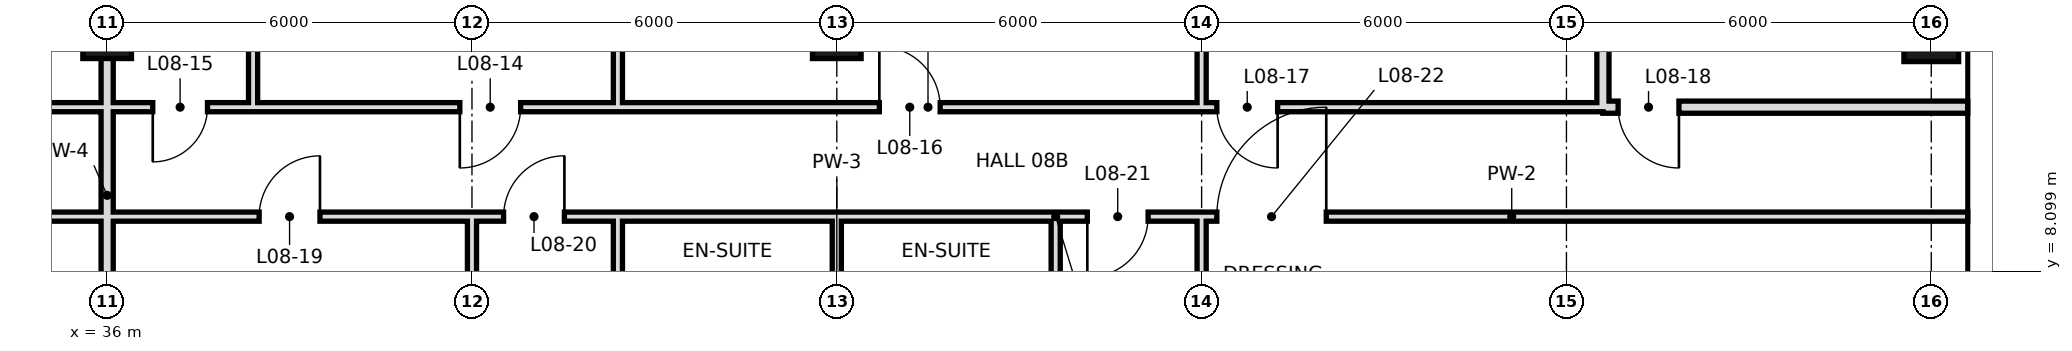
"""IFC4 building model, lengths in metres.
Left out: names, types, materials, properties, quantities, classifications, styles, units other than length and angle.
Written with IfcOpenShell. Run it as: python <this file> out.ifc"""

import sys

from ifc_helpers import new_model, si_unit, direction, frame, frame_2d, origin, origin_2d, place, context, subcontext, project, spatial, rectangle, hollow_rectangle, extrude, element, fill, save


model = new_model("IFC4")
c1 = context("Model", 3, precision=1e-05, world=origin(), true_north=direction((0.0, 1.0)))
c2 = subcontext(c1, "Body", "Model", "MODEL_VIEW")
j1 = project(units=[si_unit("LENGTHUNIT", "METRE"), si_unit("PLANEANGLEUNIT", "RADIAN")], contexts=[c1])
p1 = place(None, origin())
s1 = spatial("IfcSite", under=j1, at=p1, CompositionType="ELEMENT")
p2 = place(p1, origin())
s2 = spatial("IfcBuilding", under=s1, at=p2, CompositionType="ELEMENT")
p3 = place(p2, frame((0.0, 0.0, 49.8)))
s3 = spatial("IfcBuildingStorey", under=s2, at=p3, CompositionType="ELEMENT", Elevation=49.8)
for number, where, z_axis, x_axis in (
    (1, (36.0, 12.0, 0.0), (0.0, 0.0, 1.0), (1.0, 0.0, 0.0)),
    (2, (48.0, 12.0, 0.0), (0.0, 0.0, 1.0), (1.0, 0.0, 0.0)),
):
    element("IfcColumn", number, at=place(p3, frame(where, z_axis=z_axis, x_axis=x_axis)), inside=s3, PredefinedType="COLUMN", context=c2, shape_type="SweptSolid", body=[
        extrude(hollow_rectangle(XDim=0.8, YDim=0.8, WallThickness=0.04, at=origin_2d()), origin(), (0.0, 0.0, 1.0), 3.6),
    ])
p4 = place(p3, frame((66.0, 12.0, 0.0), z_axis=(0.0, 0.0, 1.0), x_axis=(1.0, 0.0, 0.0)))
e3 = element("IfcColumn", 3, at=p4, inside=s3, PredefinedType="COLUMN", context=c2, shape_type="SweptSolid", body=[
    extrude(hollow_rectangle(XDim=0.9, YDim=0.9, WallThickness=0.045, at=origin_2d()), origin(), (0.0, 0.0, 1.0), 3.6),
])
p5 = place(p3, frame((36.0, 0.0, 0.0), z_axis=(0.0, 0.0, 1.0), x_axis=(0.0, 1.0, 0.0)))
e4 = element("IfcWall", 4, at=p5, inside=s3, PredefinedType="SOLIDWALL", context=c2, shape_type="SweptSolid", body=[
    extrude(rectangle(XDim=18.7, YDim=0.2, at=frame_2d((9.35, 0.0))), origin(), (0.0, 0.0, 1.0), 2.72),
])
p6 = place(p3, frame((38.4, 10.8, 0.0), z_axis=(0.0, 0.0, 1.0), x_axis=(0.0, 1.0, 0.0)))
e5 = element("IfcWall", 5, at=p6, inside=s3, PredefinedType="PARTITIONING", context=c2, shape_type="SweptSolid", body=[
    extrude(rectangle(XDim=7.9, YDim=0.15, at=frame_2d((3.95, 0.0))), origin(), (0.0, 0.0, 1.0), 3.42),
])
p7 = place(p3, frame((42.0, -0.6, 0.0), z_axis=(0.0, 0.0, 1.0), x_axis=(0.0, 1.0, 0.0)))
e6 = element("IfcWall", 6, at=p7, inside=s3, PredefinedType="PARTITIONING", context=c2, shape_type="SweptSolid", body=[
    extrude(rectangle(XDim=9.6, YDim=0.15, at=frame_2d((4.8, 0.0))), origin(), (0.0, 0.0, 1.0), 2.72),
])
p8 = place(p3, frame((44.4, 10.8, 0.0), z_axis=(0.0, 0.0, 1.0), x_axis=(0.0, 1.0, 0.0)))
e7 = element("IfcWall", 7, at=p8, inside=s3, PredefinedType="PARTITIONING", context=c2, shape_type="SweptSolid", body=[
    extrude(rectangle(XDim=7.9, YDim=0.15, at=frame_2d((3.95, 0.0))), origin(), (0.0, 0.0, 1.0), 3.42),
])
p9 = place(p3, frame((44.4, 6.0, 0.0), z_axis=(0.0, 0.0, 1.0), x_axis=(0.0, 1.0, 0.0)))
e8 = element("IfcWall", 8, at=p9, inside=s3, PredefinedType="PARTITIONING", context=c2, shape_type="SweptSolid", body=[
    extrude(rectangle(XDim=3.0, YDim=0.15, at=frame_2d((1.5, 0.0))), origin(), (0.0, 0.0, 1.0), 3.42),
])
p10 = place(p3, frame((48.0, 6.0, 0.0), z_axis=(0.0, 0.0, 1.0), x_axis=(0.0, 1.0, 0.0)))
e9 = element("IfcWall", 9, at=p10, inside=s3, PredefinedType="PARTITIONING", context=c2, shape_type="SweptSolid", body=[
    extrude(rectangle(XDim=3.0, YDim=0.15, at=frame_2d((1.5, 0.0))), origin(), (0.0, 0.0, 1.0), 2.72),
])
p11 = place(p3, frame((51.6, 6.0, 0.0), z_axis=(0.0, 0.0, 1.0), x_axis=(0.0, 1.0, 0.0)))
e10 = element("IfcWall", 10, at=p11, inside=s3, PredefinedType="PARTITIONING", context=c2, shape_type="SweptSolid", body=[
    extrude(rectangle(XDim=3.0, YDim=0.15, at=frame_2d((1.5, 0.0))), origin(), (0.0, 0.0, 1.0), 3.42),
])
p12 = place(p3, frame((54.0, -0.6, 0.0), z_axis=(0.0, 0.0, 1.0), x_axis=(0.0, 1.0, 0.0)))
e11 = element("IfcWall", 11, at=p12, inside=s3, PredefinedType="PARTITIONING", context=c2, shape_type="SweptSolid", body=[
    extrude(rectangle(XDim=9.6, YDim=0.15, at=frame_2d((4.8, 0.0))), origin(), (0.0, 0.0, 1.0), 3.42),
])
p13 = place(p3, frame((54.0, 10.8, 0.0), z_axis=(0.0, 0.0, 1.0), x_axis=(0.0, 1.0, 0.0)))
e12 = element("IfcWall", 12, at=p13, inside=s3, PredefinedType="PARTITIONING", context=c2, shape_type="SweptSolid", body=[
    extrude(rectangle(XDim=7.2, YDim=0.15, at=frame_2d((3.6, 0.0))), origin(), (0.0, 0.0, 1.0), 3.42),
])
p14 = place(p3, frame((60.6, 10.8, 0.0), z_axis=(0.0, 0.0, 1.0), x_axis=(0.0, 1.0, 0.0)))
e13 = element("IfcWall", 13, at=p14, inside=s3, PredefinedType="SOLIDWALL", context=c2, shape_type="SweptSolid", body=[
    extrude(rectangle(XDim=7.2, YDim=0.2, at=frame_2d((3.6, 0.0))), origin(), (0.0, 0.0, 1.0), 2.52),
])
p15 = place(p3, frame((60.6, 10.8, 0.0), z_axis=(0.0, 0.0, 1.0), x_axis=(1.0, 0.0, 0.0)))
e14 = element("IfcWall", 14, at=p15, inside=s3, PredefinedType="SOLIDWALL", context=c2, shape_type="SweptSolid", body=[
    extrude(rectangle(XDim=6.0, YDim=0.2, at=frame_2d((3.0, 0.0))), origin(), (0.0, 0.0, 1.0), 2.97),
])
p16 = place(p15, frame((0.25, 0.0, 0.0)))
e15 = element("IfcOpeningElement", 15, at=p16, cuts=e14, PredefinedType="OPENING", context=c2, shape_type="SweptSolid", body=[
    extrude(rectangle(XDim=1.0, YDim=2.4, at=frame_2d((0.5, 1.2))), frame((0.0, 0.11, 0.0), z_axis=(0.0, -1.0, 0.0), x_axis=(1.0, 0.0, 0.0)), (0.0, 0.0, 1.0), 0.22),
])
p17 = place(p3, frame((6.6, 10.8, 0.0), z_axis=(0.0, 0.0, 1.0), x_axis=(1.0, 0.0, 0.0)))
e16 = element("IfcWall", 16, at=p17, inside=s3, PredefinedType="PARTITIONING", context=c2, shape_type="SweptSolid", body=[
    extrude(rectangle(XDim=29.4, YDim=0.15, at=frame_2d((14.7, 0.0))), origin(), (0.0, 0.0, 1.0), 3.42),
])
p18 = place(p17, frame((26.8, 0.0, 0.0)))
e17 = element("IfcOpeningElement", 17, at=p18, cuts=e16, PredefinedType="OPENING", context=c2, shape_type="SweptSolid", body=[
    extrude(rectangle(XDim=1.0, YDim=2.4, at=frame_2d((0.5, 1.2))), frame((0.0, 0.085, 0.0), z_axis=(0.0, -1.0, 0.0), x_axis=(1.0, 0.0, 0.0)), (0.0, 0.0, 1.0), 0.17),
])
p19 = place(p17, frame((3.22, 0.0, 0.0)))
e18 = element("IfcOpeningElement", 18, at=p19, cuts=e16, PredefinedType="OPENING", context=c2, shape_type="SweptSolid", body=[
    extrude(rectangle(XDim=1.0, YDim=2.4, at=frame_2d((0.5, 1.2))), frame((0.0, 0.085, 0.0), z_axis=(0.0, -1.0, 0.0), x_axis=(1.0, 0.0, 0.0)), (0.0, 0.0, 1.0), 0.17),
])
p20 = place(p17, frame((14.8, 0.0, 0.0)))
e19 = element("IfcOpeningElement", 19, at=p20, cuts=e16, PredefinedType="OPENING", context=c2, shape_type="SweptSolid", body=[
    extrude(rectangle(XDim=1.0, YDim=2.4, at=frame_2d((0.5, 1.2))), frame((0.0, 0.085, 0.0), z_axis=(0.0, -1.0, 0.0), x_axis=(1.0, 0.0, 0.0)), (0.0, 0.0, 1.0), 0.17),
])
p21 = place(p3, frame((38.4, 10.8, 0.0), z_axis=(0.0, 0.0, 1.0), x_axis=(1.0, 0.0, 0.0)))
e20 = element("IfcWall", 20, at=p21, inside=s3, PredefinedType="PARTITIONING", context=c2, shape_type="SweptSolid", body=[
    extrude(rectangle(XDim=22.2, YDim=0.15, at=frame_2d((11.1, 0.0))), origin(), (0.0, 0.0, 1.0), 3.42),
])
p22 = place(p21, frame((3.4, 0.0, 0.0)))
e21 = element("IfcOpeningElement", 21, at=p22, cuts=e20, PredefinedType="OPENING", context=c2, shape_type="SweptSolid", body=[
    extrude(rectangle(XDim=1.0, YDim=2.4, at=frame_2d((0.5, 1.2))), frame((0.0, 0.085, 0.0), z_axis=(0.0, -1.0, 0.0), x_axis=(1.0, 0.0, 0.0)), (0.0, 0.0, 1.0), 0.17),
])
p23 = place(p21, frame((10.3, 0.0, 0.0)))
e22 = element("IfcOpeningElement", 22, at=p23, cuts=e20, PredefinedType="OPENING", context=c2, shape_type="SweptSolid", body=[
    extrude(rectangle(XDim=1.0, YDim=2.4, at=frame_2d((0.5, 1.2))), frame((0.0, 0.085, 0.0), z_axis=(0.0, -1.0, 0.0), x_axis=(1.0, 0.0, 0.0)), (0.0, 0.0, 1.0), 0.17),
])
p24 = place(p21, frame((15.85, 0.0, 0.0)))
e23 = element("IfcOpeningElement", 23, at=p24, cuts=e20, PredefinedType="OPENING", context=c2, shape_type="SweptSolid", body=[
    extrude(rectangle(XDim=1.0, YDim=2.4, at=frame_2d((0.5, 1.2))), frame((0.0, 0.085, 0.0), z_axis=(0.0, -1.0, 0.0), x_axis=(1.0, 0.0, 0.0)), (0.0, 0.0, 1.0), 0.17),
])
p25 = place(p3, frame((36.0, 10.8, 0.0), z_axis=(0.0, 0.0, 1.0), x_axis=(1.0, 0.0, 0.0)))
e24 = element("IfcWall", 24, at=p25, inside=s3, PredefinedType="PARTITIONING", context=c2, shape_type="SweptSolid", body=[
    extrude(rectangle(XDim=2.4, YDim=0.15, at=frame_2d((1.2, 0.0))), origin(), (0.0, 0.0, 1.0), 3.42),
])
p26 = place(p25, frame((0.75, 0.0, 0.0)))
e25 = element("IfcOpeningElement", 25, at=p26, cuts=e24, PredefinedType="OPENING", context=c2, shape_type="SweptSolid", body=[
    extrude(rectangle(XDim=0.9, YDim=2.4, at=frame_2d((0.45, 1.2))), frame((0.0, 0.085, 0.0), z_axis=(0.0, -1.0, 0.0), x_axis=(1.0, 0.0, 0.0)), (0.0, 0.0, 1.0), 0.17),
])
p27 = place(p3, frame((8.4, 9.0, 0.0), z_axis=(0.0, 0.0, 1.0), x_axis=(1.0, 0.0, 0.0)))
e26 = element("IfcWall", 26, at=p27, inside=s3, PredefinedType="PARTITIONING", context=c2, shape_type="SweptSolid", body=[
    extrude(rectangle(XDim=36.0, YDim=0.15, at=frame_2d((18.0, 0.0))), origin(), (0.0, 0.0, 1.0), 3.42),
])
p28 = place(p27, frame((0.88, 0.0, 0.0)))
e27 = element("IfcOpeningElement", 27, at=p28, cuts=e26, PredefinedType="OPENING", context=c2, shape_type="SweptSolid", body=[
    extrude(rectangle(XDim=1.0, YDim=2.4, at=frame_2d((0.5, 1.2))), frame((0.0, 0.085, 0.0), z_axis=(0.0, -1.0, 0.0), x_axis=(1.0, 0.0, 0.0)), (0.0, 0.0, 1.0), 0.17),
])
p29 = place(p27, frame((6.1, 0.0, 0.0)))
e28 = element("IfcOpeningElement", 28, at=p29, cuts=e26, PredefinedType="OPENING", context=c2, shape_type="SweptSolid", body=[
    extrude(rectangle(XDim=1.0, YDim=2.4, at=frame_2d((0.5, 1.2))), frame((0.0, 0.085, 0.0), z_axis=(0.0, -1.0, 0.0), x_axis=(1.0, 0.0, 0.0)), (0.0, 0.0, 1.0), 0.17),
])
p30 = place(p27, frame((16.64, 0.0, 0.0)))
e29 = element("IfcOpeningElement", 29, at=p30, cuts=e26, PredefinedType="OPENING", context=c2, shape_type="SweptSolid", body=[
    extrude(rectangle(XDim=1.8, YDim=2.4, at=frame_2d((0.9, 1.2))), frame((0.0, 0.085, 0.0), z_axis=(0.0, -1.0, 0.0), x_axis=(1.0, 0.0, 0.0)), (0.0, 0.0, 1.0), 0.17),
])
p31 = place(p27, frame((23.7, 0.0, 0.0)))
e30 = element("IfcOpeningElement", 30, at=p31, cuts=e26, PredefinedType="OPENING", context=c2, shape_type="SweptSolid", body=[
    extrude(rectangle(XDim=1.8, YDim=2.4, at=frame_2d((0.9, 1.2))), frame((0.0, 0.085, 0.0), z_axis=(0.0, -1.0, 0.0), x_axis=(1.0, 0.0, 0.0)), (0.0, 0.0, 1.0), 0.17),
])
p32 = place(p27, frame((30.1, 0.0, 0.0)))
e31 = element("IfcOpeningElement", 31, at=p32, cuts=e26, PredefinedType="OPENING", context=c2, shape_type="SweptSolid", body=[
    extrude(rectangle(XDim=1.0, YDim=2.4, at=frame_2d((0.5, 1.2))), frame((0.0, 0.085, 0.0), z_axis=(0.0, -1.0, 0.0), x_axis=(1.0, 0.0, 0.0)), (0.0, 0.0, 1.0), 0.17),
])
p33 = place(p27, frame((34.12, 0.0, 0.0)))
e32 = element("IfcOpeningElement", 32, at=p33, cuts=e26, PredefinedType="OPENING", context=c2, shape_type="SweptSolid", body=[
    extrude(rectangle(XDim=1.0, YDim=2.4, at=frame_2d((0.5, 1.2))), frame((0.0, 0.085, 0.0), z_axis=(0.0, -1.0, 0.0), x_axis=(1.0, 0.0, 0.0)), (0.0, 0.0, 1.0), 0.17),
])
p34 = place(p3, frame((51.6, 9.0, 0.0), z_axis=(0.0, 0.0, 1.0), x_axis=(1.0, 0.0, 0.0)))
e33 = element("IfcWall", 33, at=p34, inside=s3, PredefinedType="PARTITIONING", context=c2, shape_type="SweptSolid", body=[
    extrude(rectangle(XDim=15.0, YDim=0.15, at=frame_2d((7.5, 0.0))), origin(), (0.0, 0.0, 1.0), 3.42),
])
p35 = place(p34, frame((0.52, 0.0, 0.0)))
e34 = element("IfcOpeningElement", 34, at=p35, cuts=e33, PredefinedType="OPENING", context=c2, shape_type="SweptSolid", body=[
    extrude(rectangle(XDim=1.0, YDim=2.4, at=frame_2d((0.5, 1.2))), frame((0.0, 0.085, 0.0), z_axis=(0.0, -1.0, 0.0), x_axis=(1.0, 0.0, 0.0)), (0.0, 0.0, 1.0), 0.17),
])
p36 = place(p34, frame((2.65, 0.0, 0.0)))
e35 = element("IfcOpeningElement", 35, at=p36, cuts=e33, PredefinedType="OPENING", context=c2, shape_type="SweptSolid", body=[
    extrude(rectangle(XDim=1.8, YDim=2.4, at=frame_2d((0.9, 1.2))), frame((0.0, 0.085, 0.0), z_axis=(0.0, -1.0, 0.0), x_axis=(1.0, 0.0, 0.0)), (0.0, 0.0, 1.0), 0.17),
])
p37 = place(p3, frame((44.4, 9.0, 0.0), z_axis=(0.0, 0.0, 1.0), x_axis=(1.0, 0.0, 0.0)))
e36 = element("IfcWall", 36, at=p37, inside=s3, PredefinedType="PARTITIONING", context=c2, shape_type="SweptSolid", body=[
    extrude(rectangle(XDim=7.2, YDim=0.15, at=frame_2d((3.6, 0.0))), origin(), (0.0, 0.0, 1.0), 3.42),
])
p38 = place(p22, frame((1.0, 0.0, 0.0), z_axis=(0.0, 0.0, 1.0), x_axis=(-1.0, 0.0, 0.0)))
e37 = element("IfcDoor", 37, at=p38, inside=s3, OperationType="SINGLE_SWING_RIGHT", PredefinedType="DOOR", context=c2, shape_type="SweptSolid", body=[
    extrude(rectangle(XDim=1.0, YDim=2.4, at=frame_2d((0.5, 1.2))), frame((0.0, 0.025, 0.0), z_axis=(0.0, -1.0, 0.0), x_axis=(1.0, 0.0, 0.0)), (0.0, 0.0, 1.0), 0.05),
])
fill(e21, e37)
p39 = place(p26, frame((0.9, 0.0, 0.0), z_axis=(0.0, 0.0, 1.0), x_axis=(-1.0, 0.0, 0.0)))
e38 = element("IfcDoor", 38, at=p39, inside=s3, OperationType="SINGLE_SWING_RIGHT", PredefinedType="DOOR", context=c2, shape_type="SweptSolid", body=[
    extrude(rectangle(XDim=0.9, YDim=2.4, at=frame_2d((0.45, 1.2))), frame((0.0, 0.025, 0.0), z_axis=(0.0, -1.0, 0.0), x_axis=(1.0, 0.0, 0.0)), (0.0, 0.0, 1.0), 0.05),
])
fill(e25, e38)
p40 = place(p23, origin())
e39 = element("IfcDoor", 39, at=p40, inside=s3, OperationType="SINGLE_SWING_LEFT", PredefinedType="DOOR", context=c2, shape_type="SweptSolid", body=[
    extrude(rectangle(XDim=1.0, YDim=2.4, at=frame_2d((0.5, 1.2))), frame((0.0, 0.025, 0.0), z_axis=(0.0, -1.0, 0.0), x_axis=(1.0, 0.0, 0.0)), (0.0, 0.0, 1.0), 0.05),
])
fill(e22, e39)
p41 = place(p24, origin())
e40 = element("IfcDoor", 40, at=p41, inside=s3, OperationType="SINGLE_SWING_RIGHT", PredefinedType="DOOR", context=c2, shape_type="SweptSolid", body=[
    extrude(rectangle(XDim=1.0, YDim=2.4, at=frame_2d((0.5, 1.2))), frame((0.0, 0.025, 0.0), z_axis=(0.0, -1.0, 0.0), x_axis=(1.0, 0.0, 0.0)), (0.0, 0.0, 1.0), 0.05),
])
fill(e23, e40)
p42 = place(p16, origin())
e41 = element("IfcDoor", 41, at=p42, inside=s3, OperationType="SINGLE_SWING_RIGHT", PredefinedType="DOOR", context=c2, shape_type="SweptSolid", body=[
    extrude(rectangle(XDim=1.0, YDim=2.4, at=frame_2d((0.5, 1.2))), frame((0.0, 0.025, 0.0), z_axis=(0.0, -1.0, 0.0), x_axis=(1.0, 0.0, 0.0)), (0.0, 0.0, 1.0), 0.05),
])
fill(e15, e41)
p43 = place(p32, frame((1.0, 0.0, 0.0), z_axis=(0.0, 0.0, 1.0), x_axis=(-1.0, 0.0, 0.0)))
e42 = element("IfcDoor", 42, at=p43, inside=s3, OperationType="SINGLE_SWING_LEFT", PredefinedType="DOOR", context=c2, shape_type="SweptSolid", body=[
    extrude(rectangle(XDim=1.0, YDim=2.4, at=frame_2d((0.5, 1.2))), frame((0.0, 0.025, 0.0), z_axis=(0.0, -1.0, 0.0), x_axis=(1.0, 0.0, 0.0)), (0.0, 0.0, 1.0), 0.05),
])
fill(e31, e42)
p44 = place(p33, frame((1.0, 0.0, 0.0), z_axis=(0.0, 0.0, 1.0), x_axis=(-1.0, 0.0, 0.0)))
e43 = element("IfcDoor", 43, at=p44, inside=s3, OperationType="SINGLE_SWING_LEFT", PredefinedType="DOOR", context=c2, shape_type="SweptSolid", body=[
    extrude(rectangle(XDim=1.0, YDim=2.4, at=frame_2d((0.5, 1.2))), frame((0.0, 0.025, 0.0), z_axis=(0.0, -1.0, 0.0), x_axis=(1.0, 0.0, 0.0)), (0.0, 0.0, 1.0), 0.05),
])
fill(e32, e43)
p45 = place(p35, frame((1.0, 0.0, 0.0), z_axis=(0.0, 0.0, 1.0), x_axis=(-1.0, 0.0, 0.0)))
e44 = element("IfcDoor", 44, at=p45, inside=s3, OperationType="SINGLE_SWING_RIGHT", PredefinedType="DOOR", context=c2, shape_type="SweptSolid", body=[
    extrude(rectangle(XDim=1.0, YDim=2.4, at=frame_2d((0.5, 1.2))), frame((0.0, 0.025, 0.0), z_axis=(0.0, -1.0, 0.0), x_axis=(1.0, 0.0, 0.0)), (0.0, 0.0, 1.0), 0.05),
])
fill(e34, e44)
p46 = place(p36, frame((1.8, 0.0, 0.0), z_axis=(0.0, 0.0, 1.0), x_axis=(-1.0, 0.0, 0.0)))
e45 = element("IfcDoor", 45, at=p46, inside=s3, OperationType="SINGLE_SWING_LEFT", PredefinedType="DOOR", context=c2, shape_type="SweptSolid", body=[
    extrude(rectangle(XDim=1.8, YDim=2.4, at=frame_2d((0.9, 1.2))), frame((0.0, 0.025, 0.0), z_axis=(0.0, -1.0, 0.0), x_axis=(1.0, 0.0, 0.0)), (0.0, 0.0, 1.0), 0.05),
])
fill(e35, e45)
save(model, sys.argv[1])
